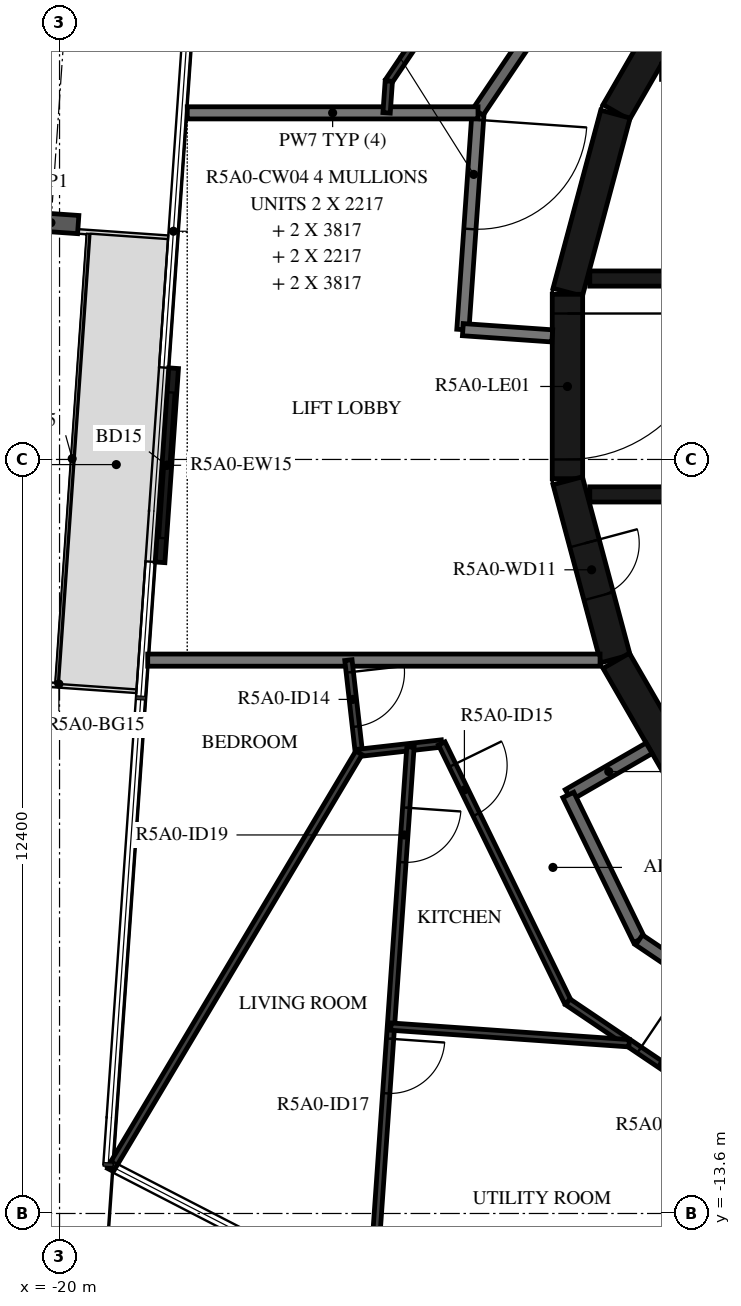
"""IFC4 building model, lengths in metres.
Left out: names, types, materials, properties, quantities, classifications, styles, units other than length and angle.
Written with IfcOpenShell. Run it as: python <this file> out.ifc"""

import sys

from ifc_helpers import new_model, si_unit, direction, frame, frame_2d, origin, origin_2d, place, context, subcontext, project, spatial, rectangle, i_section, extrude, element, fill, save


model = new_model("IFC4")
c1 = context("Model", 3, precision=1e-05, world=origin(), true_north=direction((0.0, 1.0)))
c2 = subcontext(c1, "Body", "Model", "MODEL_VIEW")
j1 = project(units=[si_unit("LENGTHUNIT", "METRE"), si_unit("PLANEANGLEUNIT", "RADIAN")], contexts=[c1])
p1 = place(None, origin())
s1 = spatial("IfcSite", under=j1, at=p1, CompositionType="ELEMENT")
p2 = place(p1, origin())
s2 = spatial("IfcBuilding", under=s1, at=p2, CompositionType="ELEMENT")
p3 = place(p2, frame((0.0, 0.0, 195.4)))
s3 = spatial("IfcBuildingStorey", under=s2, at=p3, CompositionType="ELEMENT", Elevation=195.4)
p4 = place(p3, frame((-20.142, 2.694, -0.38), z_axis=(0.0, 0.0, 1.0), x_axis=(0.069756005795, 0.997564082982, 0.0)))
e1 = element("IfcColumn", 1, at=p4, inside=s3, PredefinedType="COLUMN", context=c2, shape_type="SweptSolid", body=[
    extrude(i_section(OverallWidth=0.3, OverallDepth=0.9, WebThickness=0.019, FlangeThickness=0.035, FilletRadius=0.03, at=origin_2d()), origin(), (0.0, 0.0, 1.0), 3.5),
])
p5 = place(p3, frame((-18.124, 0.301, 0.0), z_axis=(0.0, 0.0, 1.0), x_axis=(-0.069728915792, -0.997565976917, 0.0)))
e2 = element("IfcWall", 2, at=p5, inside=s3, PredefinedType="STANDARD", context=c2, shape_type="SweptSolid", body=[
    extrude(rectangle(XDim=3.2, YDim=0.16, at=frame_2d((1.6, 0.0))), origin(), (0.0, 0.0, 1.0), 3.12),
])
p6 = place(p5, frame((0.4, 0.0, 0.0)))
e3 = element("IfcOpeningElement", 3, at=p6, cuts=e2, PredefinedType="OPENING", context=c2, shape_type="SweptSolid", body=[
    extrude(rectangle(XDim=2.4, YDim=2.4, at=frame_2d((1.2, 1.2))), frame((0.0, 0.09, 0.0), z_axis=(0.0, -1.0, 0.0), x_axis=(1.0, 0.0, 0.0)), (0.0, 0.0, 1.0), 0.18),
])
for number, where, z_axis, x_axis in (
    (4, (-9.329, 7.137, 0.0), (0.0, 0.0, 1.0), (-0.5, -0.866, 0.0)),
    (5, (-10.858, 4.479, 0.0), (0.0, 0.0, 1.0), (-0.259, -0.966, 0.0)),
):
    element("IfcWall", number, at=place(p3, frame(where, z_axis=z_axis, x_axis=x_axis)), inside=s3, PredefinedType="SHEAR", context=c2, shape_type="SweptSolid", body=[
        extrude(rectangle(XDim=3.033, YDim=0.5, at=frame_2d((1.516, 0.0))), origin(), (0.0, 0.0, 1.0), 3.12),
    ])
p7 = place(p3, frame((-11.647, 1.516, 0.0), z_axis=(0.0, 0.0, 1.0), x_axis=(0.0, -1.0, 0.0)))
e6 = element("IfcWall", 6, at=p7, inside=s3, PredefinedType="SHEAR", context=c2, shape_type="SweptSolid", body=[
    extrude(rectangle(XDim=3.033, YDim=0.5, at=frame_2d((1.516, 0.0))), origin(), (0.0, 0.0, 1.0), 3.12),
])
p8 = place(p7, frame((0.316, 0.0, 0.0)))
e7 = element("IfcOpeningElement", 7, at=p8, cuts=e6, PredefinedType="OPENING", context=c2, shape_type="SweptSolid", body=[
    extrude(rectangle(XDim=2.4, YDim=2.1, at=frame_2d((1.2, 1.05))), frame((0.0, 0.26, 0.0), z_axis=(0.0, -1.0, 0.0), x_axis=(1.0, 0.0, 0.0)), (0.0, 0.0, 1.0), 0.52),
])
p9 = place(p3, frame((-11.643, -1.55, 0.0), z_axis=(0.0, 0.0, 1.0), x_axis=(0.258734743916, -0.965948410781, 0.0)))
e8 = element("IfcWall", 8, at=p9, inside=s3, PredefinedType="SHEAR", context=c2, shape_type="SweptSolid", body=[
    extrude(rectangle(XDim=3.033, YDim=0.5, at=frame_2d((1.516, 0.0))), origin(), (0.0, 0.0, 1.0), 3.12),
])
p10 = place(p9, frame((1.066, 0.0, 0.0)))
e9 = element("IfcOpeningElement", 9, at=p10, cuts=e8, PredefinedType="OPENING", context=c2, shape_type="SweptSolid", body=[
    extrude(rectangle(XDim=0.9, YDim=2.1, at=frame_2d((0.45, 1.05))), frame((0.0, 0.26, 0.0), z_axis=(0.0, -1.0, 0.0), x_axis=(1.0, 0.0, 0.0)), (0.0, 0.0, 1.0), 0.52),
])
p11 = place(p3, frame((-10.845, -4.51, 0.0), z_axis=(0.0, 0.0, 1.0), x_axis=(0.500087131594, -0.865975092491, 0.0)))
e10 = element("IfcWall", 10, at=p11, inside=s3, PredefinedType="SHEAR", context=c2, shape_type="SweptSolid", body=[
    extrude(rectangle(XDim=3.033, YDim=0.5, at=frame_2d((1.516, 0.0))), origin(), (0.0, 0.0, 1.0), 3.12),
])
p12 = place(p3, frame((-11.28, 1.775, 0.0), z_axis=(0.0, 0.0, 1.0), x_axis=(1.0, 0.0, 0.0)))
e11 = element("IfcWall", 11, at=p12, inside=s3, PredefinedType="SHEAR", context=c2, shape_type="SweptSolid", body=[
    extrude(rectangle(XDim=14.38, YDim=0.25, at=frame_2d((7.19, 0.0))), origin(), (0.0, 0.0, 1.0), 3.12),
])
p13 = place(p12, frame((10.73, 0.0, 0.0)))
e12 = element("IfcOpeningElement", 12, at=p13, cuts=e11, PredefinedType="OPENING", context=c2, shape_type="SweptSolid", body=[
    extrude(rectangle(XDim=1.1, YDim=2.1, at=frame_2d((0.55, 1.05))), frame((0.0, 0.135, 0.0), z_axis=(0.0, -1.0, 0.0), x_axis=(1.0, 0.0, 0.0)), (0.0, 0.0, 1.0), 0.27),
])
p14 = place(p12, frame((12.88, 0.0, 0.0)))
e13 = element("IfcOpeningElement", 13, at=p14, cuts=e11, PredefinedType="OPENING", context=c2, shape_type="SweptSolid", body=[
    extrude(rectangle(XDim=1.1, YDim=2.1, at=frame_2d((0.55, 1.05))), frame((0.0, 0.135, 0.0), z_axis=(0.0, -1.0, 0.0), x_axis=(1.0, 0.0, 0.0)), (0.0, 0.0, 1.0), 0.27),
])
p15 = place(p12, frame((3.305, 0.0, 0.0)))
e14 = element("IfcOpeningElement", 14, at=p15, cuts=e11, PredefinedType="OPENING", context=c2, shape_type="SweptSolid", body=[
    extrude(rectangle(XDim=0.9, YDim=2.1, at=frame_2d((0.45, 1.05))), frame((0.0, 0.135, 0.0), z_axis=(0.0, -1.0, 0.0), x_axis=(1.0, 0.0, 0.0)), (0.0, 0.0, 1.0), 0.27),
])
p16 = place(p12, frame((7.605, 0.0, 0.0)))
e15 = element("IfcOpeningElement", 15, at=p16, cuts=e11, PredefinedType="OPENING", context=c2, shape_type="SweptSolid", body=[
    extrude(rectangle(XDim=0.9, YDim=2.1, at=frame_2d((0.45, 1.05))), frame((0.0, 0.135, 0.0), z_axis=(0.0, -1.0, 0.0), x_axis=(1.0, 0.0, 0.0)), (0.0, 0.0, 1.0), 0.27),
])
p17 = place(p3, frame((-11.28, -1.775, 0.0), z_axis=(0.0, 0.0, 1.0), x_axis=(1.0, 0.0, 0.0)))
e16 = element("IfcWall", 16, at=p17, inside=s3, PredefinedType="SHEAR", context=c2, shape_type="SweptSolid", body=[
    extrude(rectangle(XDim=14.38, YDim=0.25, at=frame_2d((7.19, 0.0))), origin(), (0.0, 0.0, 1.0), 3.12),
])
p18 = place(p17, frame((12.88, 0.0, 0.0)))
e17 = element("IfcOpeningElement", 17, at=p18, cuts=e16, PredefinedType="OPENING", context=c2, shape_type="SweptSolid", body=[
    extrude(rectangle(XDim=1.1, YDim=2.1, at=frame_2d((0.55, 1.05))), frame((0.0, 0.135, 0.0), z_axis=(0.0, -1.0, 0.0), x_axis=(1.0, 0.0, 0.0)), (0.0, 0.0, 1.0), 0.27),
])
p19 = place(p17, frame((6.53, 0.0, 0.0)))
e18 = element("IfcOpeningElement", 18, at=p19, cuts=e16, PredefinedType="OPENING", context=c2, shape_type="SweptSolid", body=[
    extrude(rectangle(XDim=0.9, YDim=2.1, at=frame_2d((0.45, 1.05))), frame((0.0, 0.135, 0.0), z_axis=(0.0, -1.0, 0.0), x_axis=(1.0, 0.0, 0.0)), (0.0, 0.0, 1.0), 0.27),
])
p20 = place(p17, frame((8.68, 0.0, 0.0)))
e19 = element("IfcOpeningElement", 19, at=p20, cuts=e16, PredefinedType="OPENING", context=c2, shape_type="SweptSolid", body=[
    extrude(rectangle(XDim=0.9, YDim=2.1, at=frame_2d((0.45, 1.05))), frame((0.0, 0.135, 0.0), z_axis=(0.0, -1.0, 0.0), x_axis=(1.0, 0.0, 0.0)), (0.0, 0.0, 1.0), 0.27),
])
p21 = place(p17, frame((10.83, 0.0, 0.0)))
e20 = element("IfcOpeningElement", 20, at=p21, cuts=e16, PredefinedType="OPENING", context=c2, shape_type="SweptSolid", body=[
    extrude(rectangle(XDim=0.9, YDim=2.1, at=frame_2d((0.45, 1.05))), frame((0.0, 0.135, 0.0), z_axis=(0.0, -1.0, 0.0), x_axis=(1.0, 0.0, 0.0)), (0.0, 0.0, 1.0), 0.27),
])
p22 = place(p3, frame((-13.118, 4.5, 0.0), z_axis=(0.0, 0.0, 1.0), x_axis=(-0.069746872611, -0.99756472159, 0.0)))
e21 = element("IfcWall", 21, at=p22, inside=s3, PredefinedType="STANDARD", context=c2, shape_type="SweptSolid", body=[
    extrude(rectangle(XDim=3.574, YDim=0.2, at=frame_2d((1.787, 0.0))), origin(), (0.0, 0.0, 1.0), 3.12),
])
p23 = place(p22, frame((0.115, 0.0, 0.0)))
e22 = element("IfcOpeningElement", 22, at=p23, cuts=e21, PredefinedType="OPENING", context=c2, shape_type="SweptSolid", body=[
    extrude(rectangle(XDim=1.8, YDim=2.1, at=frame_2d((0.9, 1.05))), frame((0.0, 0.11, 0.0), z_axis=(0.0, -1.0, 0.0), x_axis=(1.0, 0.0, 0.0)), (0.0, 0.0, 1.0), 0.22),
])
p24 = place(p3, frame((-13.367, 0.935, 0.0), z_axis=(0.0, 0.0, 1.0), x_axis=(0.997553656289, -0.069904955655, 0.0)))
e23 = element("IfcWall", 23, at=p24, inside=s3, PredefinedType="STANDARD", context=c2, shape_type="SweptSolid", body=[
    extrude(rectangle(XDim=1.474, YDim=0.2, at=frame_2d((0.737, 0.0))), origin(), (0.0, 0.0, 1.0), 3.12),
])
p25 = place(p3, frame((-9.101, 10.47, 0.0), z_axis=(0.0, 0.0, 1.0), x_axis=(-0.559195469534, -0.829035841718, 0.0)))
e24 = element("IfcWall", 24, at=p25, inside=s3, PredefinedType="STANDARD", context=c2, shape_type="SweptSolid", body=[
    extrude(rectangle(XDim=7.181, YDim=0.2, at=frame_2d((3.591, 0.0))), origin(), (0.0, 0.0, 1.0), 3.12),
])
p26 = place(p25, frame((1.0, 0.0, 0.0)))
e25 = element("IfcOpeningElement", 25, at=p26, cuts=e24, PredefinedType="OPENING", context=c2, shape_type="SweptSolid", body=[
    extrude(rectangle(XDim=1.0, YDim=2.1, at=frame_2d((0.5, 1.05))), frame((0.0, 0.11, 0.0), z_axis=(0.0, -1.0, 0.0), x_axis=(1.0, 0.0, 0.0)), (0.0, 0.0, 1.0), 0.22),
])
p27 = place(p3, frame((-10.303, -5.949, 0.0), z_axis=(0.0, 0.0, 1.0), x_axis=(-0.866042588199, -0.499970234539, 0.0)))
e26 = element("IfcWall", 26, at=p27, inside=s3, PredefinedType="STANDARD", context=c2, shape_type="SweptSolid", body=[
    extrude(rectangle(XDim=1.535, YDim=0.2, at=frame_2d((0.768, 0.0))), origin(), (0.0, 0.0, 1.0), 3.12),
])
p28 = place(p3, frame((-11.633, -6.716, 0.0), z_axis=(0.0, 0.0, 1.0), x_axis=(0.438322116278, -0.898817958422, 0.0)))
e27 = element("IfcWall", 27, at=p28, inside=s3, PredefinedType="STANDARD", context=c2, shape_type="SweptSolid", body=[
    extrude(rectangle(XDim=2.654, YDim=0.2, at=frame_2d((1.327, 0.0))), origin(), (0.0, 0.0, 1.0), 3.12),
])
p29 = place(p3, frame((-10.47, -9.101, 0.0), z_axis=(0.0, 0.0, 1.0), x_axis=(0.829035841718, -0.559195469534, 0.0)))
e28 = element("IfcWall", 28, at=p29, inside=s3, PredefinedType="STANDARD", context=c2, shape_type="SweptSolid", body=[
    extrude(rectangle(XDim=7.181, YDim=0.2, at=frame_2d((3.591, 0.0))), origin(), (0.0, 0.0, 1.0), 3.12),
])
p30 = place(p29, frame((2.39, 0.0, 0.0)))
e29 = element("IfcOpeningElement", 29, at=p30, cuts=e28, PredefinedType="OPENING", context=c2, shape_type="SweptSolid", body=[
    extrude(rectangle(XDim=1.0, YDim=2.1, at=frame_2d((0.5, 1.05))), frame((0.0, 0.11, 0.0), z_axis=(0.0, -1.0, 0.0), x_axis=(1.0, 0.0, 0.0)), (0.0, 0.0, 1.0), 0.22),
])
p31 = place(p3, frame((-13.118, 4.5, 0.0), z_axis=(0.0, 0.0, 1.0), x_axis=(-1.0, 0.0, 0.0)))
e30 = element("IfcWall", 30, at=p31, inside=s3, PredefinedType="STANDARD", context=c2, shape_type="SweptSolid", body=[
    extrude(rectangle(XDim=4.782, YDim=0.2, at=frame_2d((2.391, 0.0))), origin(), (0.0, 0.0, 1.0), 3.12),
])
p32 = place(p3, frame((-18.55, -4.5, 0.0), z_axis=(0.0, 0.0, 1.0), x_axis=(1.0, 0.0, 0.0)))
e31 = element("IfcWall", 31, at=p32, inside=s3, PredefinedType="STANDARD", context=c2, shape_type="SweptSolid", body=[
    extrude(rectangle(XDim=7.438, YDim=0.2, at=frame_2d((3.719, 0.0))), origin(), (0.0, 0.0, 1.0), 3.12),
])
p33 = place(p3, frame((-10.407, -15.43, 0.0), z_axis=(0.0, 0.0, 1.0), x_axis=(0.559038328133, 0.829141813973, 0.0)))
e32 = element("IfcWall", 32, at=p33, inside=s3, PredefinedType="STANDARD", context=c2, shape_type="SweptSolid", body=[
    extrude(rectangle(XDim=5.212, YDim=0.2, at=frame_2d((2.606, 0.0))), origin(), (0.0, 0.0, 1.0), 3.12),
])
p34 = place(p3, frame((-10.12, 11.642, 0.0), z_axis=(0.0, 0.0, 1.0), x_axis=(-0.55920080659, -0.829032241779, 0.0)))
e33 = element("IfcWall", 33, at=p34, inside=s3, PredefinedType="PARTITIONING", context=c2, shape_type="SweptSolid", body=[
    extrude(rectangle(XDim=7.985, YDim=0.12, at=frame_2d((3.992, 0.0))), origin(), (0.0, 0.0, 1.0), 3.12),
])
p35 = place(p34, frame((4.346, 0.0, 0.0)))
e34 = element("IfcOpeningElement", 34, at=p35, cuts=e33, PredefinedType="OPENING", context=c2, shape_type="SweptSolid", body=[
    extrude(rectangle(XDim=0.9, YDim=2.1, at=frame_2d((0.45, 1.05))), frame((0.0, 0.07, 0.0), z_axis=(0.0, -1.0, 0.0), x_axis=(1.0, 0.0, 0.0)), (0.0, 0.0, 1.0), 0.14),
])
p36 = place(p3, frame((-14.585, 5.022, 0.0), z_axis=(0.0, 0.0, 1.0), x_axis=(-0.069490327804, -0.997582625321, 0.0)))
e35 = element("IfcWall", 35, at=p36, inside=s3, PredefinedType="PARTITIONING", context=c2, shape_type="SweptSolid", body=[
    extrude(rectangle(XDim=0.523, YDim=0.12, at=frame_2d((0.262, 0.0))), origin(), (0.0, 0.0, 1.0), 3.12),
])
p37 = place(p3, frame((-15.25, -4.5, 0.0), z_axis=(0.0, 0.0, 1.0), x_axis=(0.1124919794, -0.99365263275, 0.0)))
e36 = element("IfcWall", 36, at=p37, inside=s3, PredefinedType="PARTITIONING", context=c2, shape_type="SweptSolid", body=[
    extrude(rectangle(XDim=1.534, YDim=0.12, at=frame_2d((0.767, 0.0))), origin(), (0.0, 0.0, 1.0), 3.12),
])
p38 = place(p37, frame((0.2, 0.0, 0.0)))
e37 = element("IfcOpeningElement", 37, at=p38, cuts=e36, PredefinedType="OPENING", context=c2, shape_type="SweptSolid", body=[
    extrude(rectangle(XDim=0.9, YDim=2.1, at=frame_2d((0.45, 1.05))), frame((0.0, 0.07, 0.0), z_axis=(0.0, -1.0, 0.0), x_axis=(1.0, 0.0, 0.0)), (0.0, 0.0, 1.0), 0.14),
])
p39 = place(p3, frame((-15.077, -6.025, 0.0), z_axis=(0.0, 0.0, 1.0), x_axis=(0.993646958109, 0.112542092746, 0.0)))
e38 = element("IfcWall", 38, at=p39, inside=s3, PredefinedType="PARTITIONING", context=c2, shape_type="SweptSolid", body=[
    extrude(rectangle(XDim=1.371, YDim=0.12, at=frame_2d((0.686, 0.0))), origin(), (0.0, 0.0, 1.0), 3.12),
])
p40 = place(p3, frame((-13.715, -5.87, 0.0), z_axis=(0.0, 0.0, 1.0), x_axis=(0.438372766482, -0.89879325632, 0.0)))
e39 = element("IfcWall", 39, at=p40, inside=s3, PredefinedType="PARTITIONING", context=c2, shape_type="SweptSolid", body=[
    extrude(rectangle(XDim=4.728, YDim=0.12, at=frame_2d((2.364, 0.0))), origin(), (0.0, 0.0, 1.0), 3.12),
])
p41 = place(p40, frame((0.4, 0.0, 0.0)))
e40 = element("IfcOpeningElement", 40, at=p41, cuts=e39, PredefinedType="OPENING", context=c2, shape_type="SweptSolid", body=[
    extrude(rectangle(XDim=0.9, YDim=2.1, at=frame_2d((0.45, 1.05))), frame((0.0, 0.07, 0.0), z_axis=(0.0, -1.0, 0.0), x_axis=(1.0, 0.0, 0.0)), (0.0, 0.0, 1.0), 0.14),
])
p42 = place(p3, frame((-11.642, -10.12, 0.0), z_axis=(0.0, 0.0, 1.0), x_axis=(0.829018066952, -0.559221820629, 0.0)))
e41 = element("IfcWall", 41, at=p42, inside=s3, PredefinedType="PARTITIONING", context=c2, shape_type="SweptSolid", body=[
    extrude(rectangle(XDim=3.992, YDim=0.12, at=frame_2d((1.996, 0.0))), origin(), (0.0, 0.0, 1.0), 3.12),
])
p43 = place(p42, frame((1.417, 0.0, 0.0)))
e42 = element("IfcOpeningElement", 42, at=p43, cuts=e41, PredefinedType="OPENING", context=c2, shape_type="SweptSolid", body=[
    extrude(rectangle(XDim=0.9, YDim=2.1, at=frame_2d((0.45, 1.05))), frame((0.0, 0.07, 0.0), z_axis=(0.0, -1.0, 0.0), x_axis=(1.0, 0.0, 0.0)), (0.0, 0.0, 1.0), 0.14),
])
p44 = place(p3, frame((-19.156, -12.863, 0.0), z_axis=(0.0, 0.0, 1.0), x_axis=(0.512316386407, 0.858796786335, 0.0)))
e43 = element("IfcWall", 43, at=p44, inside=s3, PredefinedType="PARTITIONING", context=c2, shape_type="SweptSolid", body=[
    extrude(rectangle(XDim=7.963, YDim=0.12, at=frame_2d((3.981, 0.0))), origin(), (0.0, 0.0, 1.0), 3.12),
])
p45 = place(p3, frame((-14.229, -5.929, 0.0), z_axis=(0.0, 0.0, 1.0), x_axis=(-0.069740723375, -0.997565151508, 0.0)))
e44 = element("IfcWall", 44, at=p45, inside=s3, PredefinedType="PARTITIONING", context=c2, shape_type="SweptSolid", body=[
    extrude(rectangle(XDim=10.47, YDim=0.12, at=frame_2d((5.235, 0.0))), origin(), (0.0, 0.0, 1.0), 3.12),
])
p46 = place(p45, frame((4.809, 0.0, 0.0)))
e45 = element("IfcOpeningElement", 45, at=p46, cuts=e44, PredefinedType="OPENING", context=c2, shape_type="SweptSolid", body=[
    extrude(rectangle(XDim=0.9, YDim=2.1, at=frame_2d((0.45, 1.05))), frame((0.0, 0.07, 0.0), z_axis=(0.0, -1.0, 0.0), x_axis=(1.0, 0.0, 0.0)), (0.0, 0.0, 1.0), 0.14),
])
p47 = place(p45, frame((1.0, 0.0, 0.0)))
e46 = element("IfcOpeningElement", 46, at=p47, cuts=e44, PredefinedType="OPENING", context=c2, shape_type="SweptSolid", body=[
    extrude(rectangle(XDim=0.9, YDim=2.1, at=frame_2d((0.45, 1.05))), frame((0.0, 0.07, 0.0), z_axis=(0.0, -1.0, 0.0), x_axis=(1.0, 0.0, 0.0)), (0.0, 0.0, 1.0), 0.14),
])
p48 = place(p3, frame((-14.551, -10.527, 0.0), z_axis=(0.0, 0.0, 1.0), x_axis=(0.997564247633, -0.069753651118, 0.0)))
e47 = element("IfcWall", 47, at=p48, inside=s3, PredefinedType="PARTITIONING", context=c2, shape_type="SweptSolid", body=[
    extrude(rectangle(XDim=3.927, YDim=0.12, at=frame_2d((1.963, 0.0))), origin(), (0.0, 0.0, 1.0), 3.12),
])
p49 = place(p6, origin())
e48 = element("IfcDoor", 48, at=p49, inside=s3, OperationType="DOUBLE_DOOR_SLIDING", PredefinedType="DOOR", context=c2, shape_type="SweptSolid", body=[
    extrude(rectangle(XDim=2.4, YDim=2.4, at=frame_2d((1.2, 1.2))), frame((0.0, 0.025, 0.0), z_axis=(0.0, -1.0, 0.0), x_axis=(1.0, 0.0, 0.0)), (0.0, 0.0, 1.0), 0.05),
])
fill(e3, e48)
p50 = place(p8, origin())
e49 = element("IfcDoor", 49, at=p50, inside=s3, OperationType="DOUBLE_DOOR_SINGLE_SWING", PredefinedType="DOOR", context=c2, shape_type="SweptSolid", body=[
    extrude(rectangle(XDim=2.4, YDim=2.1, at=frame_2d((1.2, 1.05))), frame((0.0, 0.025, 0.0), z_axis=(0.0, -1.0, 0.0), x_axis=(1.0, 0.0, 0.0)), (0.0, 0.0, 1.0), 0.05),
])
fill(e7, e49)
p51 = place(p10, origin())
e50 = element("IfcDoor", 50, at=p51, inside=s3, OperationType="SINGLE_SWING_LEFT", PredefinedType="DOOR", context=c2, shape_type="SweptSolid", body=[
    extrude(rectangle(XDim=0.9, YDim=2.1, at=frame_2d((0.45, 1.05))), frame((0.0, 0.025, 0.0), z_axis=(0.0, -1.0, 0.0), x_axis=(1.0, 0.0, 0.0)), (0.0, 0.0, 1.0), 0.05),
])
fill(e9, e50)
p52 = place(p38, origin())
e51 = element("IfcDoor", 51, at=p52, inside=s3, OperationType="SINGLE_SWING_RIGHT", PredefinedType="DOOR", context=c2, shape_type="SweptSolid", body=[
    extrude(rectangle(XDim=0.9, YDim=2.1, at=frame_2d((0.45, 1.05))), frame((0.0, 0.025, 0.0), z_axis=(0.0, -1.0, 0.0), x_axis=(1.0, 0.0, 0.0)), (0.0, 0.0, 1.0), 0.05),
])
fill(e37, e51)
p53 = place(p41, origin())
e52 = element("IfcDoor", 52, at=p53, inside=s3, OperationType="SINGLE_SWING_RIGHT", PredefinedType="DOOR", context=c2, shape_type="SweptSolid", body=[
    extrude(rectangle(XDim=0.9, YDim=2.1, at=frame_2d((0.45, 1.05))), frame((0.0, 0.025, 0.0), z_axis=(0.0, -1.0, 0.0), x_axis=(1.0, 0.0, 0.0)), (0.0, 0.0, 1.0), 0.05),
])
fill(e40, e52)
p54 = place(p43, origin())
e53 = element("IfcDoor", 53, at=p54, inside=s3, OperationType="SINGLE_SWING_RIGHT", PredefinedType="DOOR", context=c2, shape_type="SweptSolid", body=[
    extrude(rectangle(XDim=0.9, YDim=2.1, at=frame_2d((0.45, 1.05))), frame((0.0, 0.025, 0.0), z_axis=(0.0, -1.0, 0.0), x_axis=(1.0, 0.0, 0.0)), (0.0, 0.0, 1.0), 0.05),
])
fill(e42, e53)
p55 = place(p46, origin())
e54 = element("IfcDoor", 54, at=p55, inside=s3, OperationType="SINGLE_SWING_RIGHT", PredefinedType="DOOR", context=c2, shape_type="SweptSolid", body=[
    extrude(rectangle(XDim=0.9, YDim=2.1, at=frame_2d((0.45, 1.05))), frame((0.0, 0.025, 0.0), z_axis=(0.0, -1.0, 0.0), x_axis=(1.0, 0.0, 0.0)), (0.0, 0.0, 1.0), 0.05),
])
fill(e45, e54)
p56 = place(p47, origin())
e55 = element("IfcDoor", 55, at=p56, inside=s3, OperationType="SINGLE_SWING_LEFT", PredefinedType="DOOR", context=c2, shape_type="SweptSolid", body=[
    extrude(rectangle(XDim=0.9, YDim=2.1, at=frame_2d((0.45, 1.05))), frame((0.0, 0.025, 0.0), z_axis=(0.0, -1.0, 0.0), x_axis=(1.0, 0.0, 0.0)), (0.0, 0.0, 1.0), 0.05),
])
fill(e46, e55)
p57 = place(p23, origin())
e56 = element("IfcDoor", 56, at=p57, inside=s3, OperationType="DOUBLE_DOOR_SINGLE_SWING", PredefinedType="DOOR", context=c2, shape_type="SweptSolid", body=[
    extrude(rectangle(XDim=1.8, YDim=2.1, at=frame_2d((0.9, 1.05))), frame((0.0, 0.025, 0.0), z_axis=(0.0, -1.0, 0.0), x_axis=(1.0, 0.0, 0.0)), (0.0, 0.0, 1.0), 0.05),
])
fill(e22, e56)
save(model, sys.argv[1])
